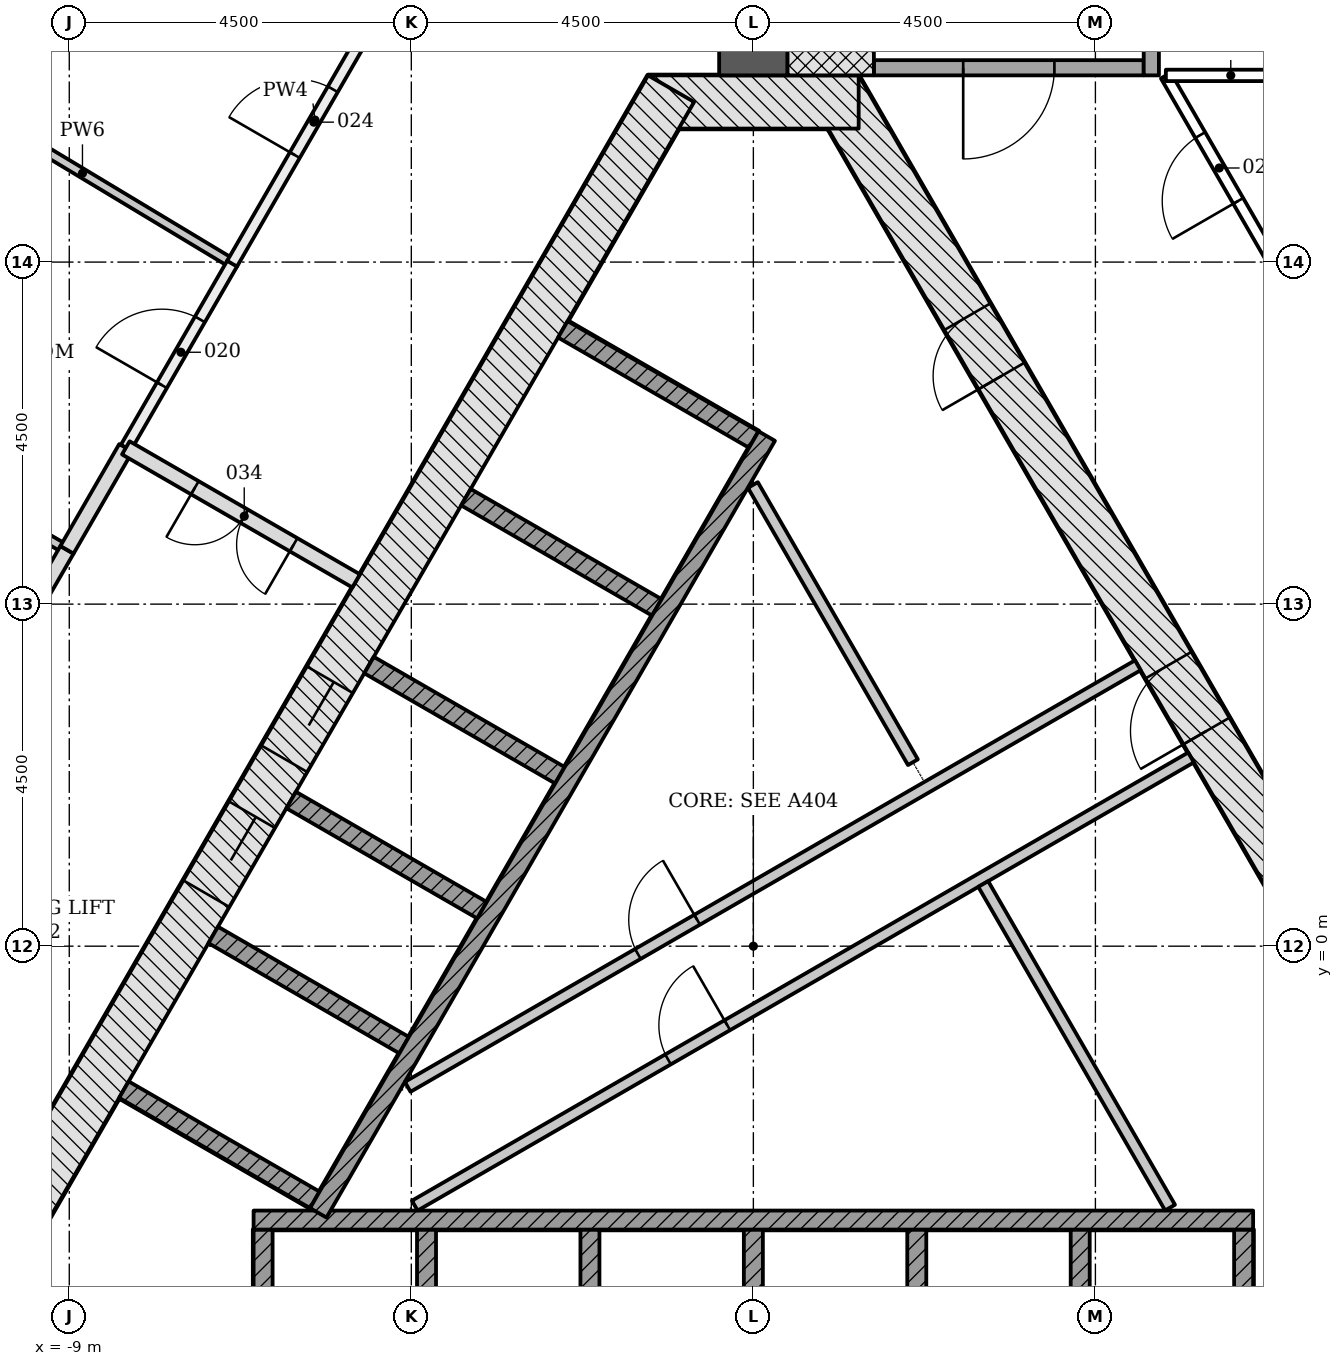
"""IFC4 building model, lengths in metres.
Left out: names, types, materials, properties, quantities, classifications, styles, units other than length and angle.
Written with IfcOpenShell. Run it as: python <this file> out.ifc"""

import sys

from ifc_helpers import new_model, si_unit, direction, frame, frame_2d, origin, place, context, subcontext, project, spatial, rectangle, extrude, element, fill, save


model = new_model("IFC4")
c1 = context("Model", 3, precision=1e-05, world=origin(), true_north=direction((0.0, 1.0)))
c2 = subcontext(c1, "Body", "Model", "MODEL_VIEW")
j1 = project(units=[si_unit("LENGTHUNIT", "METRE"), si_unit("PLANEANGLEUNIT", "RADIAN")], contexts=[c1])
p1 = place(None, origin())
s1 = spatial("IfcSite", under=j1, at=p1, CompositionType="ELEMENT")
p2 = place(p1, origin())
s2 = spatial("IfcBuilding", under=s1, at=p2, CompositionType="ELEMENT")
p3 = place(p2, frame((0.0, 0.0, 10.5)))
s3 = spatial("IfcBuildingStorey", under=s2, at=p3, CompositionType="ELEMENT", Elevation=10.5)
p4 = place(p3, frame((10.311, -4.703, -0.25), z_axis=(0.0, 0.0, 1.0), x_axis=(-0.500001446645, 0.866024568562, 0.0)))
e1 = element("IfcWall", 1, at=p4, inside=s3, PredefinedType="SHEAR", context=c2, shape_type="SweptSolid", body=[
    extrude(rectangle(XDim=18.458, YDim=0.7, at=frame_2d((9.229, 0.0))), origin(), (0.0, 0.0, 1.0), 4.5),
])
p5 = place(p4, frame((8.7, 0.0, 0.25)))
e2 = element("IfcOpeningElement", 2, at=p5, cuts=e1, PredefinedType="OPENING", context=c2, shape_type="SweptSolid", body=[
    extrude(rectangle(XDim=1.0, YDim=2.1, at=frame_2d((0.5, 1.05))), frame((0.0, 0.36, 0.0), z_axis=(0.0, -1.0, 0.0), x_axis=(1.0, 0.0, 0.0)), (0.0, 0.0, 1.0), 0.72),
])
p6 = place(p4, frame((4.002, 0.0, 0.25)))
e3 = element("IfcOpeningElement", 3, at=p6, cuts=e1, PredefinedType="OPENING", context=c2, shape_type="SweptSolid", body=[
    extrude(rectangle(XDim=0.9, YDim=2.1, at=frame_2d((0.45, 1.05))), frame((0.0, 0.36, 0.0), z_axis=(0.0, -1.0, 0.0), x_axis=(1.0, 0.0, 0.0)), (0.0, 0.0, 1.0), 0.72),
])
p7 = place(p4, frame((14.093, 0.0, 0.25)))
e4 = element("IfcOpeningElement", 4, at=p7, cuts=e1, PredefinedType="OPENING", context=c2, shape_type="SweptSolid", body=[
    extrude(rectangle(XDim=0.9, YDim=2.1, at=frame_2d((0.45, 1.05))), frame((0.0, 0.36, 0.0), z_axis=(0.0, -1.0, 0.0), x_axis=(1.0, 0.0, 0.0)), (0.0, 0.0, 1.0), 0.72),
])
p8 = place(p3, frame((1.386, 11.106, -0.25), z_axis=(0.0, 0.0, 1.0), x_axis=(-1.0, 0.0, 0.0)))
e5 = element("IfcWall", 5, at=p8, inside=s3, PredefinedType="SHEAR", context=c2, shape_type="SweptSolid", body=[
    extrude(rectangle(XDim=2.771, YDim=0.7, at=frame_2d((1.386, 0.0))), origin(), (0.0, 0.0, 1.0), 4.5),
])
p9 = place(p3, frame((-1.083, 11.281, -0.25), z_axis=(0.0, 0.0, 1.0), x_axis=(-0.500001446645, -0.866024568562, 0.0)))
e6 = element("IfcWall", 6, at=p9, inside=s3, PredefinedType="SHEAR", context=c2, shape_type="SweptSolid", body=[
    extrude(rectangle(XDim=18.458, YDim=0.7, at=frame_2d((9.229, 0.0))), origin(), (0.0, 0.0, 1.0), 4.5),
])
p10 = place(p9, frame((8.979, 0.0, 0.25)))
e7 = element("IfcOpeningElement", 7, at=p10, cuts=e6, PredefinedType="OPENING", context=c2, shape_type="SweptSolid", body=[
    extrude(rectangle(XDim=1.2, YDim=2.1, at=frame_2d((0.6, 1.05))), frame((0.0, 0.36, 0.0), z_axis=(0.0, -1.0, 0.0), x_axis=(1.0, 0.0, 0.0)), (0.0, 0.0, 1.0), 0.72),
])
p11 = place(p9, frame((11.029, 0.0, 0.25)))
e8 = element("IfcOpeningElement", 8, at=p11, cuts=e6, PredefinedType="OPENING", context=c2, shape_type="SweptSolid", body=[
    extrude(rectangle(XDim=1.2, YDim=2.1, at=frame_2d((0.6, 1.05))), frame((0.0, 0.36, 0.0), z_axis=(0.0, -1.0, 0.0), x_axis=(1.0, 0.0, 0.0)), (0.0, 0.0, 1.0), 0.72),
])
p12 = place(p3, frame((-10.311, -4.353, -0.25), z_axis=(0.0, 0.0, 1.0), x_axis=(0.500042739161, -0.866000726912, 0.0)))
e9 = element("IfcWall", 9, at=p12, inside=s3, PredefinedType="SHEAR", context=c2, shape_type="SweptSolid", body=[
    extrude(rectangle(XDim=2.771, YDim=0.7, at=frame_2d((1.386, 0.0))), origin(), (0.0, 0.0, 1.0), 4.5),
])
p13 = place(p3, frame((0.0, 11.456, -0.25), z_axis=(0.0, 0.0, 1.0), x_axis=(0.0, 1.0, 0.0)))
e10 = element("IfcWall", 10, at=p13, inside=s3, PredefinedType="SHEAR", context=c2, shape_type="SweptSolid", body=[
    extrude(rectangle(XDim=14.633, YDim=0.9, at=frame_2d((7.316, 0.0))), origin(), (0.0, 0.0, 1.0), 4.5),
])
p14 = place(p13, frame((7.35, 0.0, 0.25)))
e11 = element("IfcOpeningElement", 11, at=p14, cuts=e10, PredefinedType="OPENING", context=c2, shape_type="SweptSolid", body=[
    extrude(rectangle(XDim=1.5, YDim=2.1, at=frame_2d((0.75, 1.05))), frame((0.0, 0.46, 0.0), z_axis=(0.0, -1.0, 0.0), x_axis=(1.0, 0.0, 0.0)), (0.0, 0.0, 1.0), 0.92),
])
for number, where, z_axis, x_axis in (
    (12, (-6.45, -6.228, -0.25), (0.0, 0.0, 1.0), (0.0, 1.0, 0.0)),
    (13, (-4.3, -6.228, -0.25), (0.0, 0.0, 1.0), (0.0, 1.0, 0.0)),
    (14, (-2.15, -6.228, -0.25), (0.0, 0.0, 1.0), (0.0, 1.0, 0.0)),
    (15, (0.0, -6.228, -0.25), (0.0, 0.0, 1.0), (0.0, 1.0, 0.0)),
    (16, (2.15, -6.228, -0.25), (0.0, 0.0, 1.0), (0.0, 1.0, 0.0)),
    (17, (4.3, -6.228, -0.25), (0.0, 0.0, 1.0), (0.0, 1.0, 0.0)),
    (18, (6.45, -6.228, -0.25), (0.0, 0.0, 1.0), (0.0, 1.0, 0.0)),
):
    element("IfcWall", number, at=place(p3, frame(where, z_axis=z_axis, x_axis=x_axis)), inside=s3, PredefinedType="PARTITIONING", context=c2, shape_type="SweptSolid", body=[
        extrude(rectangle(XDim=2.5, YDim=0.25, at=frame_2d((1.25, 0.0))), origin(), (0.0, 0.0, 1.0), 4.5),
    ])
p15 = place(p3, frame((-6.575, -3.603, 0.0), z_axis=(0.0, 0.0, 1.0), x_axis=(1.0, 0.0, 0.0)))
e19 = element("IfcWall", 19, at=p15, inside=s3, PredefinedType="PARTITIONING", context=c2, shape_type="SweptSolid", body=[
    extrude(rectangle(XDim=13.15, YDim=0.25, at=frame_2d((6.575, 0.0))), origin(), (0.0, 0.0, 1.0), 4.25),
])
p16 = place(p3, frame((-2.506, 8.115, -0.25), z_axis=(0.0, 0.0, 1.0), x_axis=(0.865996321171, -0.50005036918, 0.0)))
e20 = element("IfcWall", 20, at=p16, inside=s3, PredefinedType="PARTITIONING", context=c2, shape_type="SweptSolid", body=[
    extrude(rectangle(XDim=2.9, YDim=0.25, at=frame_2d((1.45, 0.0))), origin(), (0.0, 0.0, 1.0), 4.5),
])
for number, where, z_axis, x_axis in (
    (21, (-3.781, 5.907, -0.25), (0.0, 0.0, 1.0), (0.866, -0.5, 0.0)),
    (22, (-5.056, 3.699, -0.25), (0.0, 0.0, 1.0), (0.866, -0.5, 0.0)),
    (23, (-6.081, 1.923, -0.25), (0.0, 0.0, 1.0), (0.866, -0.5, 0.0)),
    (24, (-7.106, 0.148, -0.25), (0.0, 0.0, 1.0), (0.866, -0.5, 0.0)),
    (25, (-8.281, -1.887, -0.25), (0.0, 0.0, 1.0), (0.866, -0.5, 0.0)),
):
    element("IfcWall", number, at=place(p3, frame(where, z_axis=z_axis, x_axis=x_axis)), inside=s3, PredefinedType="PARTITIONING", context=c2, shape_type="SweptSolid", body=[
        extrude(rectangle(XDim=2.9, YDim=0.25, at=frame_2d((1.45, 0.0))), origin(), (0.0, 0.0, 1.0), 4.5),
    ])
p17 = place(p3, frame((0.176, 6.711, 0.0), z_axis=(0.0, 0.0, 1.0), x_axis=(-0.500004227369, -0.866022963098, 0.0)))
e26 = element("IfcWall", 26, at=p17, inside=s3, PredefinedType="PARTITIONING", context=c2, shape_type="SweptSolid", body=[
    extrude(rectangle(XDim=11.8, YDim=0.25, at=frame_2d((5.9, 0.0))), origin(), (0.0, 0.0, 1.0), 4.25),
])
p18 = place(p3, frame((-4.548, -1.851, 0.0), z_axis=(0.0, 0.0, 1.0), x_axis=(0.866023939251, 0.500002536638, 0.0)))
e27 = element("IfcWall", 27, at=p18, inside=s3, PredefinedType="PARTITIONING", context=c2, shape_type="SweptSolid", body=[
    extrude(rectangle(XDim=11.092, YDim=0.15, at=frame_2d((5.546, 0.0))), origin(), (0.0, 0.0, 1.0), 4.25),
])
p19 = place(p18, frame((3.497, 0.0, 0.0)))
e28 = element("IfcOpeningElement", 28, at=p19, cuts=e27, PredefinedType="OPENING", context=c2, shape_type="SweptSolid", body=[
    extrude(rectangle(XDim=0.9, YDim=2.1, at=frame_2d((0.45, 1.05))), frame((0.0, 0.085, 0.0), z_axis=(0.0, -1.0, 0.0), x_axis=(1.0, 0.0, 0.0)), (0.0, 0.0, 1.0), 0.17),
])
p20 = place(p3, frame((2.099, 2.42, 0.0), z_axis=(0.0, 0.0, 1.0), x_axis=(-0.499998449073, 0.866026299211, 0.0)))
e29 = element("IfcWall", 29, at=p20, inside=s3, PredefinedType="PARTITIONING", context=c2, shape_type="SweptSolid", body=[
    extrude(rectangle(XDim=4.211, YDim=0.15, at=frame_2d((2.106, 0.0))), origin(), (0.0, 0.0, 1.0), 4.25),
])
p21 = place(p3, frame((-4.454, -3.413, 0.0), z_axis=(0.0, 0.0, 1.0), x_axis=(0.86603043987, 0.499991277142, 0.0)))
e30 = element("IfcWall", 30, at=p21, inside=s3, PredefinedType="PARTITIONING", context=c2, shape_type="SweptSolid", body=[
    extrude(rectangle(XDim=11.792, YDim=0.15, at=frame_2d((5.896, 0.0))), origin(), (0.0, 0.0, 1.0), 4.25),
])
p22 = place(p21, frame((3.847, 0.0, 0.0)))
e31 = element("IfcOpeningElement", 31, at=p22, cuts=e30, PredefinedType="OPENING", context=c2, shape_type="SweptSolid", body=[
    extrude(rectangle(XDim=0.9, YDim=2.1, at=frame_2d((0.45, 1.05))), frame((0.0, 0.085, 0.0), z_axis=(0.0, -1.0, 0.0), x_axis=(1.0, 0.0, 0.0)), (0.0, 0.0, 1.0), 0.17),
])
p23 = place(p3, frame((5.482, -3.439, 0.0), z_axis=(0.0, 0.0, 1.0), x_axis=(-0.500006183238, 0.866021833861, 0.0)))
e32 = element("IfcWall", 32, at=p23, inside=s3, PredefinedType="PARTITIONING", context=c2, shape_type="SweptSolid", body=[
    extrude(rectangle(XDim=4.916, YDim=0.15, at=frame_2d((2.458, 0.0))), origin(), (0.0, 0.0, 1.0), 4.25),
])
p24 = place(p3, frame((5.135, 11.556, -0.25), z_axis=(0.0, 0.0, 1.0), x_axis=(-1.0, 0.0, 0.0)))
e33 = element("IfcWall", 33, at=p24, inside=s3, PredefinedType="SHEAR", context=c2, shape_type="SweptSolid", body=[
    extrude(rectangle(XDim=3.55, YDim=0.2, at=frame_2d((1.775, 0.0))), origin(), (0.0, 0.0, 1.0), 4.5),
])
p25 = place(p24, frame((1.175, 0.0, 0.25)))
e34 = element("IfcOpeningElement", 34, at=p25, cuts=e33, PredefinedType="OPENING", context=c2, shape_type="SweptSolid", body=[
    extrude(rectangle(XDim=1.2, YDim=2.1, at=frame_2d((0.6, 1.05))), frame((0.0, 0.11, 0.0), z_axis=(0.0, -1.0, 0.0), x_axis=(1.0, 0.0, 0.0)), (0.0, 0.0, 1.0), 0.22),
])
p26 = place(p3, frame((5.236, 11.456, -0.25), z_axis=(0.0, 0.0, 1.0), x_axis=(0.0, 1.0, 0.0)))
e35 = element("IfcWall", 35, at=p26, inside=s3, PredefinedType="SHEAR", context=c2, shape_type="SweptSolid", body=[
    extrude(rectangle(XDim=5.6, YDim=0.2, at=frame_2d((2.8, 0.0))), origin(), (0.0, 0.0, 1.0), 4.5),
])
p27 = place(p26, frame((0.45, 0.0, 0.25)))
e36 = element("IfcOpeningElement", 36, at=p27, cuts=e35, PredefinedType="OPENING", context=c2, shape_type="SweptSolid", body=[
    extrude(rectangle(XDim=1.2, YDim=2.1, at=frame_2d((0.6, 1.05))), frame((0.0, 0.11, 0.0), z_axis=(0.0, -1.0, 0.0), x_axis=(1.0, 0.0, 0.0)), (0.0, 0.0, 1.0), 0.22),
])
p28 = place(p3, frame((1.018, 11.456, -0.25), z_axis=(0.0, 0.0, 1.0), x_axis=(0.0, 1.0, 0.0)))
e37 = element("IfcWall", 37, at=p28, inside=s3, PredefinedType="SHEAR", context=c2, shape_type="SweptSolid", body=[
    extrude(rectangle(XDim=7.2, YDim=1.136, at=frame_2d((3.6, 0.0))), origin(), (0.0, 0.0, 1.0), 4.5),
])
p29 = place(p3, frame((-9.031, 5.213, 0.0), z_axis=(0.0, 0.0, 1.0), x_axis=(-0.500044734646, -0.865999574684, 0.0)))
e38 = element("IfcWall", 38, at=p29, inside=s3, PredefinedType="PARTITIONING", context=c2, shape_type="SweptSolid", body=[
    extrude(rectangle(XDim=4.35, YDim=0.2, at=frame_2d((2.175, 0.0))), origin(), (0.0, 0.0, 1.0), 3.638),
])
p30 = place(p3, frame((-8.256, 6.556, 0.0), z_axis=(0.0, 0.0, 1.0), x_axis=(-0.499904469662, -0.866080551226, 0.0)))
e39 = element("IfcWall", 39, at=p30, inside=s3, PredefinedType="PARTITIONING", context=c2, shape_type="SweptSolid", body=[
    extrude(rectangle(XDim=1.548, YDim=0.2, at=frame_2d((0.774, 0.0))), origin(), (0.0, 0.0, 1.0), 3.638),
])
p31 = place(p3, frame((-5.226, 4.806, 0.0), z_axis=(0.0, 0.0, 1.0), x_axis=(-0.865949687125, 0.500131122175, 0.0)))
e40 = element("IfcWall", 40, at=p31, inside=s3, PredefinedType="PARTITIONING", context=c2, shape_type="SweptSolid", body=[
    extrude(rectangle(XDim=3.499, YDim=0.2, at=frame_2d((1.75, 0.0))), origin(), (0.0, 0.0, 1.0), 4.25),
])
p32 = place(p31, frame((0.95, 0.0, 0.0)))
e41 = element("IfcOpeningElement", 41, at=p32, cuts=e40, PredefinedType="OPENING", context=c2, shape_type="SweptSolid", body=[
    extrude(rectangle(XDim=1.5, YDim=2.1, at=frame_2d((0.75, 1.05))), frame((0.0, 0.11, 0.0), z_axis=(0.0, -1.0, 0.0), x_axis=(1.0, 0.0, 0.0)), (0.0, 0.0, 1.0), 0.22),
])
p33 = place(p3, frame((6.854, 8.982, 0.0), z_axis=(0.0, 0.0, 1.0), x_axis=(-0.499919889281, 0.866071650789, 0.0)))
e42 = element("IfcWall", 42, at=p33, inside=s3, PredefinedType="PARTITIONING", context=c2, shape_type="SweptSolid", body=[
    extrude(rectangle(XDim=2.854, YDim=0.15, at=frame_2d((1.427, 0.0))), origin(), (0.0, 0.0, 1.0), 3.638),
])
p34 = place(p33, frame((0.95, 0.0, 0.0)))
e43 = element("IfcOpeningElement", 43, at=p34, cuts=e42, PredefinedType="OPENING", context=c2, shape_type="SweptSolid", body=[
    extrude(rectangle(XDim=1.0, YDim=2.1, at=frame_2d((0.5, 1.05))), frame((0.0, 0.085, 0.0), z_axis=(0.0, -1.0, 0.0), x_axis=(1.0, 0.0, 0.0)), (0.0, 0.0, 1.0), 0.17),
])
p35 = place(p3, frame((5.427, 11.456, 0.0), z_axis=(0.0, 0.0, 1.0), x_axis=(1.0, 0.0, 0.0)))
e44 = element("IfcWall", 44, at=p35, inside=s3, PredefinedType="PARTITIONING", context=c2, shape_type="SweptSolid", body=[
    extrude(rectangle(XDim=1.708, YDim=0.15, at=frame_2d((0.854, 0.0))), origin(), (0.0, 0.0, 1.0), 4.25),
])
p36 = place(p3, frame((-9.032, 5.215, 0.0), z_axis=(0.0, 0.0, 1.0), x_axis=(-0.866130767322, 0.499817460578, 0.0)))
e45 = element("IfcWall", 45, at=p36, inside=s3, PredefinedType="PARTITIONING", context=c2, shape_type="SweptSolid", body=[
    extrude(rectangle(XDim=4.597, YDim=0.12, at=frame_2d((2.299, 0.0))), origin(), (0.0, 0.0, 1.0), 3.638),
])
p37 = place(p3, frame((-6.857, 8.983, 0.0), z_axis=(0.0, 0.0, 1.0), x_axis=(-0.856751730158, 0.515729069251, 0.0)))
e46 = element("IfcWall", 46, at=p37, inside=s3, PredefinedType="PARTITIONING", context=c2, shape_type="SweptSolid", body=[
    extrude(rectangle(XDim=4.598, YDim=0.12, at=frame_2d((2.299, 0.0))), origin(), (0.0, 0.0, 1.0), 3.638),
])
p38 = place(p3, frame((-8.256, 6.558, 0.0), z_axis=(0.0, 0.0, 1.0), x_axis=(0.500081734942, 0.86597820895, 0.0)))
e47 = element("IfcWall", 47, at=p38, inside=s3, PredefinedType="PARTITIONING", context=c2, shape_type="SweptSolid", body=[
    extrude(rectangle(XDim=2.804, YDim=0.15, at=frame_2d((1.402, 0.0))), origin(), (0.0, 0.0, 1.0), 3.638),
])
p39 = place(p38, frame((0.95, 0.0, 0.0)))
e48 = element("IfcOpeningElement", 48, at=p39, cuts=e47, PredefinedType="OPENING", context=c2, shape_type="SweptSolid", body=[
    extrude(rectangle(XDim=1.0, YDim=2.1, at=frame_2d((0.5, 1.05))), frame((0.0, 0.085, 0.0), z_axis=(0.0, -1.0, 0.0), x_axis=(1.0, 0.0, 0.0)), (0.0, 0.0, 1.0), 0.17),
])
p40 = place(p3, frame((-6.858, 8.979, 0.0), z_axis=(0.0, 0.0, 1.0), x_axis=(0.500105111742, 0.865964708986, 0.0)))
e49 = element("IfcWall", 49, at=p40, inside=s3, PredefinedType="PARTITIONING", context=c2, shape_type="SweptSolid", body=[
    extrude(rectangle(XDim=4.363, YDim=0.15, at=frame_2d((2.181, 0.0))), origin(), (0.0, 0.0, 1.0), 3.638),
])
p41 = place(p40, frame((1.65, 0.0, 0.0)))
e50 = element("IfcOpeningElement", 50, at=p41, cuts=e49, PredefinedType="OPENING", context=c2, shape_type="SweptSolid", body=[
    extrude(rectangle(XDim=1.0, YDim=2.1, at=frame_2d((0.5, 1.05))), frame((0.0, 0.085, 0.0), z_axis=(0.0, -1.0, 0.0), x_axis=(1.0, 0.0, 0.0)), (0.0, 0.0, 1.0), 0.17),
])
p42 = place(p3, frame((-9.17, 15.572, 0.0), z_axis=(0.0, 0.0, 1.0), x_axis=(-0.499902881486, -0.866081467924, 0.0)))
e51 = element("IfcWall", 51, at=p42, inside=s3, PredefinedType="PARTITIONING", context=c2, shape_type="SweptSolid", body=[
    extrude(rectangle(XDim=4.451, YDim=0.12, at=frame_2d((2.226, 0.0))), origin(), (0.0, 0.0, 1.0), 3.638),
])
p43 = place(p42, frame((1.75, 0.0, 0.0)))
e52 = element("IfcOpeningElement", 52, at=p43, cuts=e51, PredefinedType="OPENING", context=c2, shape_type="SweptSolid", body=[
    extrude(rectangle(XDim=1.0, YDim=2.1, at=frame_2d((0.5, 1.05))), frame((0.0, 0.07, 0.0), z_axis=(0.0, -1.0, 0.0), x_axis=(1.0, 0.0, 0.0)), (0.0, 0.0, 1.0), 0.14),
])
p44 = place(p10, origin())
e53 = element("IfcDoor", 53, at=p44, inside=s3, OperationType="DOUBLE_DOOR_SLIDING", PredefinedType="DOOR", context=c2, shape_type="SweptSolid", body=[
    extrude(rectangle(XDim=1.2, YDim=2.1, at=frame_2d((0.6, 1.05))), frame((0.0, 0.025, 0.0), z_axis=(0.0, -1.0, 0.0), x_axis=(1.0, 0.0, 0.0)), (0.0, 0.0, 1.0), 0.05),
])
fill(e7, e53)
p45 = place(p11, origin())
e54 = element("IfcDoor", 54, at=p45, inside=s3, OperationType="DOUBLE_DOOR_SLIDING", PredefinedType="DOOR", context=c2, shape_type="SweptSolid", body=[
    extrude(rectangle(XDim=1.2, YDim=2.1, at=frame_2d((0.6, 1.05))), frame((0.0, 0.025, 0.0), z_axis=(0.0, -1.0, 0.0), x_axis=(1.0, 0.0, 0.0)), (0.0, 0.0, 1.0), 0.05),
])
fill(e8, e54)
p46 = place(p5, origin())
e55 = element("IfcDoor", 55, at=p46, inside=s3, OperationType="SINGLE_SWING_LEFT", PredefinedType="DOOR", context=c2, shape_type="SweptSolid", body=[
    extrude(rectangle(XDim=1.0, YDim=2.1, at=frame_2d((0.5, 1.05))), frame((0.0, 0.075, 0.0), z_axis=(0.0, -1.0, 0.0), x_axis=(1.0, 0.0, 0.0)), (0.0, 0.0, 1.0), 0.15),
])
fill(e2, e55)
p47 = place(p7, origin())
e56 = element("IfcDoor", 56, at=p47, inside=s3, OperationType="SINGLE_SWING_LEFT", PredefinedType="DOOR", context=c2, shape_type="SweptSolid", body=[
    extrude(rectangle(XDim=0.9, YDim=2.1, at=frame_2d((0.45, 1.05))), frame((0.0, 0.075, 0.0), z_axis=(0.0, -1.0, 0.0), x_axis=(1.0, 0.0, 0.0)), (0.0, 0.0, 1.0), 0.15),
])
fill(e4, e56)
p48 = place(p22, origin())
e57 = element("IfcDoor", 57, at=p48, inside=s3, OperationType="SINGLE_SWING_RIGHT", PredefinedType="DOOR", context=c2, shape_type="SweptSolid", body=[
    extrude(rectangle(XDim=0.9, YDim=2.1, at=frame_2d((0.45, 1.05))), frame((0.0, 0.025, 0.0), z_axis=(0.0, -1.0, 0.0), x_axis=(1.0, 0.0, 0.0)), (0.0, 0.0, 1.0), 0.05),
])
fill(e31, e57)
p49 = place(p19, origin())
e58 = element("IfcDoor", 58, at=p49, inside=s3, OperationType="SINGLE_SWING_RIGHT", PredefinedType="DOOR", context=c2, shape_type="SweptSolid", body=[
    extrude(rectangle(XDim=0.9, YDim=2.1, at=frame_2d((0.45, 1.05))), frame((0.0, 0.025, 0.0), z_axis=(0.0, -1.0, 0.0), x_axis=(1.0, 0.0, 0.0)), (0.0, 0.0, 1.0), 0.05),
])
fill(e28, e58)
p50 = place(p25, origin())
e59 = element("IfcDoor", 59, at=p50, inside=s3, OperationType="SINGLE_SWING_RIGHT", PredefinedType="DOOR", context=c2, shape_type="SweptSolid", body=[
    extrude(rectangle(XDim=1.2, YDim=2.1, at=frame_2d((0.6, 1.05))), frame((0.0, 0.025, 0.0), z_axis=(0.0, -1.0, 0.0), x_axis=(1.0, 0.0, 0.0)), (0.0, 0.0, 1.0), 0.05),
])
fill(e34, e59)
p51 = place(p39, origin())
e60 = element("IfcDoor", 60, at=p51, inside=s3, OperationType="SINGLE_SWING_RIGHT", PredefinedType="DOOR", context=c2, shape_type="SweptSolid", body=[
    extrude(rectangle(XDim=1.0, YDim=2.1, at=frame_2d((0.5, 1.05))), frame((0.0, 0.025, 0.0), z_axis=(0.0, -1.0, 0.0), x_axis=(1.0, 0.0, 0.0)), (0.0, 0.0, 1.0), 0.05),
])
fill(e48, e60)
p52 = place(p41, origin())
e61 = element("IfcDoor", 61, at=p52, inside=s3, OperationType="SINGLE_SWING_LEFT", PredefinedType="DOOR", context=c2, shape_type="SweptSolid", body=[
    extrude(rectangle(XDim=1.0, YDim=2.1, at=frame_2d((0.5, 1.05))), frame((0.0, 0.025, 0.0), z_axis=(0.0, -1.0, 0.0), x_axis=(1.0, 0.0, 0.0)), (0.0, 0.0, 1.0), 0.05),
])
fill(e50, e61)
p53 = place(p34, origin())
e62 = element("IfcDoor", 62, at=p53, inside=s3, OperationType="SINGLE_SWING_LEFT", PredefinedType="DOOR", context=c2, shape_type="SweptSolid", body=[
    extrude(rectangle(XDim=1.0, YDim=2.1, at=frame_2d((0.5, 1.05))), frame((0.0, 0.025, 0.0), z_axis=(0.0, -1.0, 0.0), x_axis=(1.0, 0.0, 0.0)), (0.0, 0.0, 1.0), 0.05),
])
fill(e43, e62)
p54 = place(p32, origin())
e63 = element("IfcDoor", 63, at=p54, inside=s3, OperationType="DOUBLE_DOOR_SINGLE_SWING", PredefinedType="DOOR", context=c2, shape_type="SweptSolid", body=[
    extrude(rectangle(XDim=1.5, YDim=2.1, at=frame_2d((0.75, 1.05))), frame((0.0, 0.025, 0.0), z_axis=(0.0, -1.0, 0.0), x_axis=(1.0, 0.0, 0.0)), (0.0, 0.0, 1.0), 0.05),
])
fill(e41, e63)
save(model, sys.argv[1])
